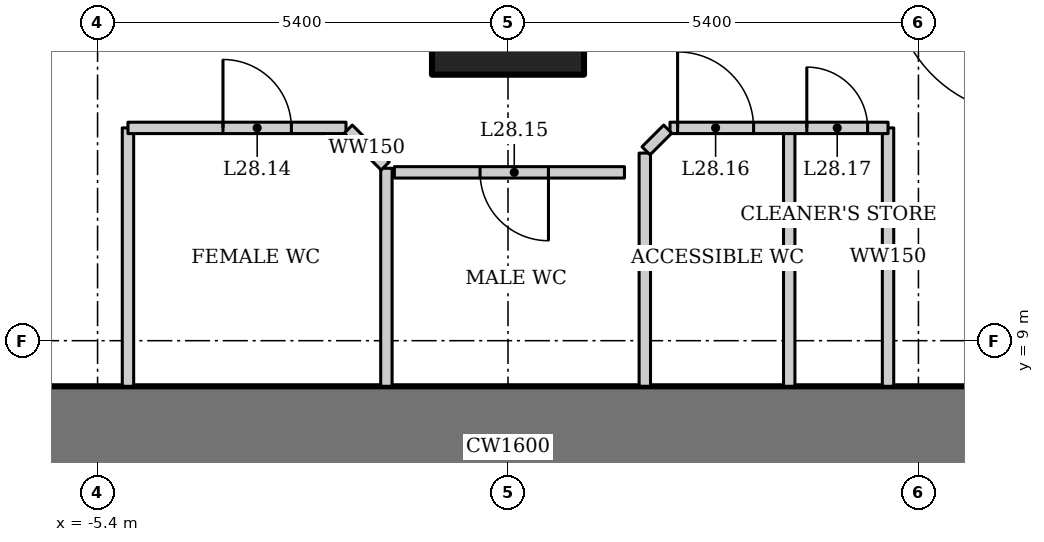
"""IFC4 building model, lengths in metres.
Left out: names, types, materials, properties, quantities, classifications, styles, units other than length and angle.
Written with IfcOpenShell. Run it as: python <this file> out.ifc"""

import sys

from ifc_helpers import new_model, si_unit, direction, frame, frame_2d, origin, origin_2d, place, context, subcontext, project, spatial, rectangle, hollow_rectangle, extrude, element, fill, save


model = new_model("IFC4")
c1 = context("Model", 3, precision=1e-05, world=origin(), true_north=direction((0.0, 1.0)))
c2 = subcontext(c1, "Body", "Model", "MODEL_VIEW")
j1 = project(units=[si_unit("LENGTHUNIT", "METRE"), si_unit("PLANEANGLEUNIT", "RADIAN")], contexts=[c1])
p1 = place(None, origin())
s1 = spatial("IfcSite", under=j1, at=p1, CompositionType="ELEMENT")
p2 = place(p1, origin())
s2 = spatial("IfcBuilding", under=s1, at=p2, CompositionType="ELEMENT")
p3 = place(p2, frame((0.0, 0.0, 121.6)))
s3 = spatial("IfcBuildingStorey", under=s2, at=p3, CompositionType="ELEMENT", Elevation=121.6)
p4 = place(p3, frame((0.0, 13.5, 0.0), z_axis=(0.0, 0.0, 1.0), x_axis=(1.0, 0.0, 0.0)))
e1 = element("IfcColumn", 1, at=p4, inside=s3, PredefinedType="COLUMN", context=c2, shape_type="SweptSolid", body=[
    extrude(hollow_rectangle(XDim=2.0, YDim=2.0, WallThickness=0.17, at=origin_2d()), origin(), (0.0, 0.0, 1.0), 4.2),
])
p5 = place(p3, frame((12.2, 7.6, 0.0), z_axis=(0.0, 0.0, 1.0), x_axis=(-1.0, 0.0, 0.0)))
e2 = element("IfcWall", 2, at=p5, inside=s3, PredefinedType="SHEAR", context=c2, shape_type="SweptSolid", body=[
    extrude(rectangle(XDim=24.4, YDim=1.6, at=frame_2d((12.2, 0.0))), origin(), (0.0, 0.0, 1.0), 4.2),
])
for number, where, z_axis, x_axis in (
    (3, (-5.0, 8.4, 0.0), (0.0, 0.0, 1.0), (0.0, 1.0, 0.0)),
    (4, (5.0, 8.4, 0.0), (0.0, 0.0, 1.0), (0.0, 1.0, 0.0)),
    (5, (3.7, 8.4, 0.0), (0.0, 0.0, 1.0), (0.0, 1.0, 0.0)),
):
    element("IfcWall", number, at=place(p3, frame(where, z_axis=z_axis, x_axis=x_axis)), inside=s3, PredefinedType="SOLIDWALL", context=c2, shape_type="SweptSolid", body=[
        extrude(rectangle(XDim=3.4, YDim=0.15, at=frame_2d((1.7, 0.0))), origin(), (0.0, 0.0, 1.0), 4.05),
    ])
p6 = place(p3, frame((-5.0, 11.8, 0.0), z_axis=(0.0, 0.0, 1.0), x_axis=(1.0, 0.0, 0.0)))
e6 = element("IfcWall", 6, at=p6, inside=s3, PredefinedType="SOLIDWALL", context=c2, shape_type="SweptSolid", body=[
    extrude(rectangle(XDim=2.869, YDim=0.15, at=frame_2d((1.434, 0.0))), origin(), (0.0, 0.0, 1.0), 4.05),
])
p7 = place(p6, frame((1.25, 0.0, 0.0)))
e7 = element("IfcOpeningElement", 7, at=p7, cuts=e6, PredefinedType="OPENING", context=c2, shape_type="SweptSolid", body=[
    extrude(rectangle(XDim=0.9, YDim=2.1, at=frame_2d((0.45, 1.05))), frame((0.0, 0.085, 0.0), z_axis=(0.0, -1.0, 0.0), x_axis=(1.0, 0.0, 0.0)), (0.0, 0.0, 1.0), 0.17),
])
p8 = place(p3, frame((2.131, 11.8, 0.0), z_axis=(0.0, 0.0, 1.0), x_axis=(1.0, 0.0, 0.0)))
e8 = element("IfcWall", 8, at=p8, inside=s3, PredefinedType="SOLIDWALL", context=c2, shape_type="SweptSolid", body=[
    extrude(rectangle(XDim=2.869, YDim=0.15, at=frame_2d((1.434, 0.0))), origin(), (0.0, 0.0, 1.0), 4.05),
])
p9 = place(p8, frame((0.1, 0.0, 0.0)))
e9 = element("IfcOpeningElement", 9, at=p9, cuts=e8, PredefinedType="OPENING", context=c2, shape_type="SweptSolid", body=[
    extrude(rectangle(XDim=1.0, YDim=2.1, at=frame_2d((0.5, 1.05))), frame((0.0, 0.085, 0.0), z_axis=(0.0, -1.0, 0.0), x_axis=(1.0, 0.0, 0.0)), (0.0, 0.0, 1.0), 0.17),
])
p10 = place(p8, frame((1.8, 0.0, 0.0)))
e10 = element("IfcOpeningElement", 10, at=p10, cuts=e8, PredefinedType="OPENING", context=c2, shape_type="SweptSolid", body=[
    extrude(rectangle(XDim=0.8, YDim=2.1, at=frame_2d((0.4, 1.05))), frame((0.0, 0.085, 0.0), z_axis=(0.0, -1.0, 0.0), x_axis=(1.0, 0.0, 0.0)), (0.0, 0.0, 1.0), 0.17),
])
p11 = place(p3, frame((-1.6, 8.4, 0.0), z_axis=(0.0, 0.0, 1.0), x_axis=(0.0, 1.0, 0.0)))
e11 = element("IfcWall", 11, at=p11, inside=s3, PredefinedType="SOLIDWALL", context=c2, shape_type="SweptSolid", body=[
    extrude(rectangle(XDim=2.869, YDim=0.15, at=frame_2d((1.434, 0.0))), origin(), (0.0, 0.0, 1.0), 4.05),
])
p12 = place(p3, frame((1.8, 8.4, 0.0), z_axis=(0.0, 0.0, 1.0), x_axis=(0.0, 1.0, 0.0)))
e12 = element("IfcWall", 12, at=p12, inside=s3, PredefinedType="SOLIDWALL", context=c2, shape_type="SweptSolid", body=[
    extrude(rectangle(XDim=3.069, YDim=0.15, at=frame_2d((1.534, 0.0))), origin(), (0.0, 0.0, 1.0), 4.05),
])
p13 = place(p3, frame((-1.616, 11.299, 0.0), z_axis=(0.0, 0.0, 1.0), x_axis=(-0.706928959799, 0.707284557867, 0.0)))
e13 = element("IfcWall", 13, at=p13, inside=s3, PredefinedType="SOLIDWALL", context=c2, shape_type="SweptSolid", body=[
    extrude(rectangle(XDim=0.687, YDim=0.15, at=frame_2d((0.343, 0.0))), origin(), (0.0, 0.0, 1.0), 4.05),
])
p14 = place(p3, frame((1.532, 11.215, 0.0), z_axis=(0.0, 0.0, 1.0), x_axis=(-1.0, 0.0, 0.0)))
e14 = element("IfcWall", 14, at=p14, inside=s3, PredefinedType="SOLIDWALL", context=c2, shape_type="SweptSolid", body=[
    extrude(rectangle(XDim=3.027, YDim=0.15, at=frame_2d((1.514, 0.0))), origin(), (0.0, 0.0, 1.0), 4.05),
])
p15 = place(p14, frame((1.0, 0.0, 0.0)))
e15 = element("IfcOpeningElement", 15, at=p15, cuts=e14, PredefinedType="OPENING", context=c2, shape_type="SweptSolid", body=[
    extrude(rectangle(XDim=0.9, YDim=2.1, at=frame_2d((0.45, 1.05))), frame((0.0, 0.085, 0.0), z_axis=(0.0, -1.0, 0.0), x_axis=(1.0, 0.0, 0.0)), (0.0, 0.0, 1.0), 0.17),
])
p16 = place(p3, frame((2.101, 11.784, 0.0), z_axis=(0.0, 0.0, 1.0), x_axis=(-0.706804405012, -0.707409028113, 0.0)))
e16 = element("IfcWall", 16, at=p16, inside=s3, PredefinedType="SOLIDWALL", context=c2, shape_type="SweptSolid", body=[
    extrude(rectangle(XDim=0.404, YDim=0.15, at=frame_2d((0.202, 0.0))), origin(), (0.0, 0.0, 1.0), 4.05),
])
p17 = place(p7, origin())
e17 = element("IfcDoor", 17, at=p17, inside=s3, OperationType="SINGLE_SWING_LEFT", PredefinedType="DOOR", context=c2, shape_type="SweptSolid", body=[
    extrude(rectangle(XDim=0.9, YDim=2.1, at=frame_2d((0.45, 1.05))), frame((0.0, 0.025, 0.0), z_axis=(0.0, -1.0, 0.0), x_axis=(1.0, 0.0, 0.0)), (0.0, 0.0, 1.0), 0.05),
])
fill(e7, e17)
p18 = place(p15, origin())
e18 = element("IfcDoor", 18, at=p18, inside=s3, OperationType="SINGLE_SWING_LEFT", PredefinedType="DOOR", context=c2, shape_type="SweptSolid", body=[
    extrude(rectangle(XDim=0.9, YDim=2.1, at=frame_2d((0.45, 1.05))), frame((0.0, 0.025, 0.0), z_axis=(0.0, -1.0, 0.0), x_axis=(1.0, 0.0, 0.0)), (0.0, 0.0, 1.0), 0.05),
])
fill(e15, e18)
p19 = place(p9, origin())
e19 = element("IfcDoor", 19, at=p19, inside=s3, OperationType="SINGLE_SWING_LEFT", PredefinedType="DOOR", context=c2, shape_type="SweptSolid", body=[
    extrude(rectangle(XDim=1.0, YDim=2.1, at=frame_2d((0.5, 1.05))), frame((0.0, 0.025, 0.0), z_axis=(0.0, -1.0, 0.0), x_axis=(1.0, 0.0, 0.0)), (0.0, 0.0, 1.0), 0.05),
])
fill(e9, e19)
p20 = place(p10, origin())
e20 = element("IfcDoor", 20, at=p20, inside=s3, OperationType="SINGLE_SWING_LEFT", PredefinedType="DOOR", context=c2, shape_type="SweptSolid", body=[
    extrude(rectangle(XDim=0.8, YDim=2.1, at=frame_2d((0.4, 1.05))), frame((0.0, 0.025, 0.0), z_axis=(0.0, -1.0, 0.0), x_axis=(1.0, 0.0, 0.0)), (0.0, 0.0, 1.0), 0.05),
])
fill(e10, e20)
save(model, sys.argv[1])
